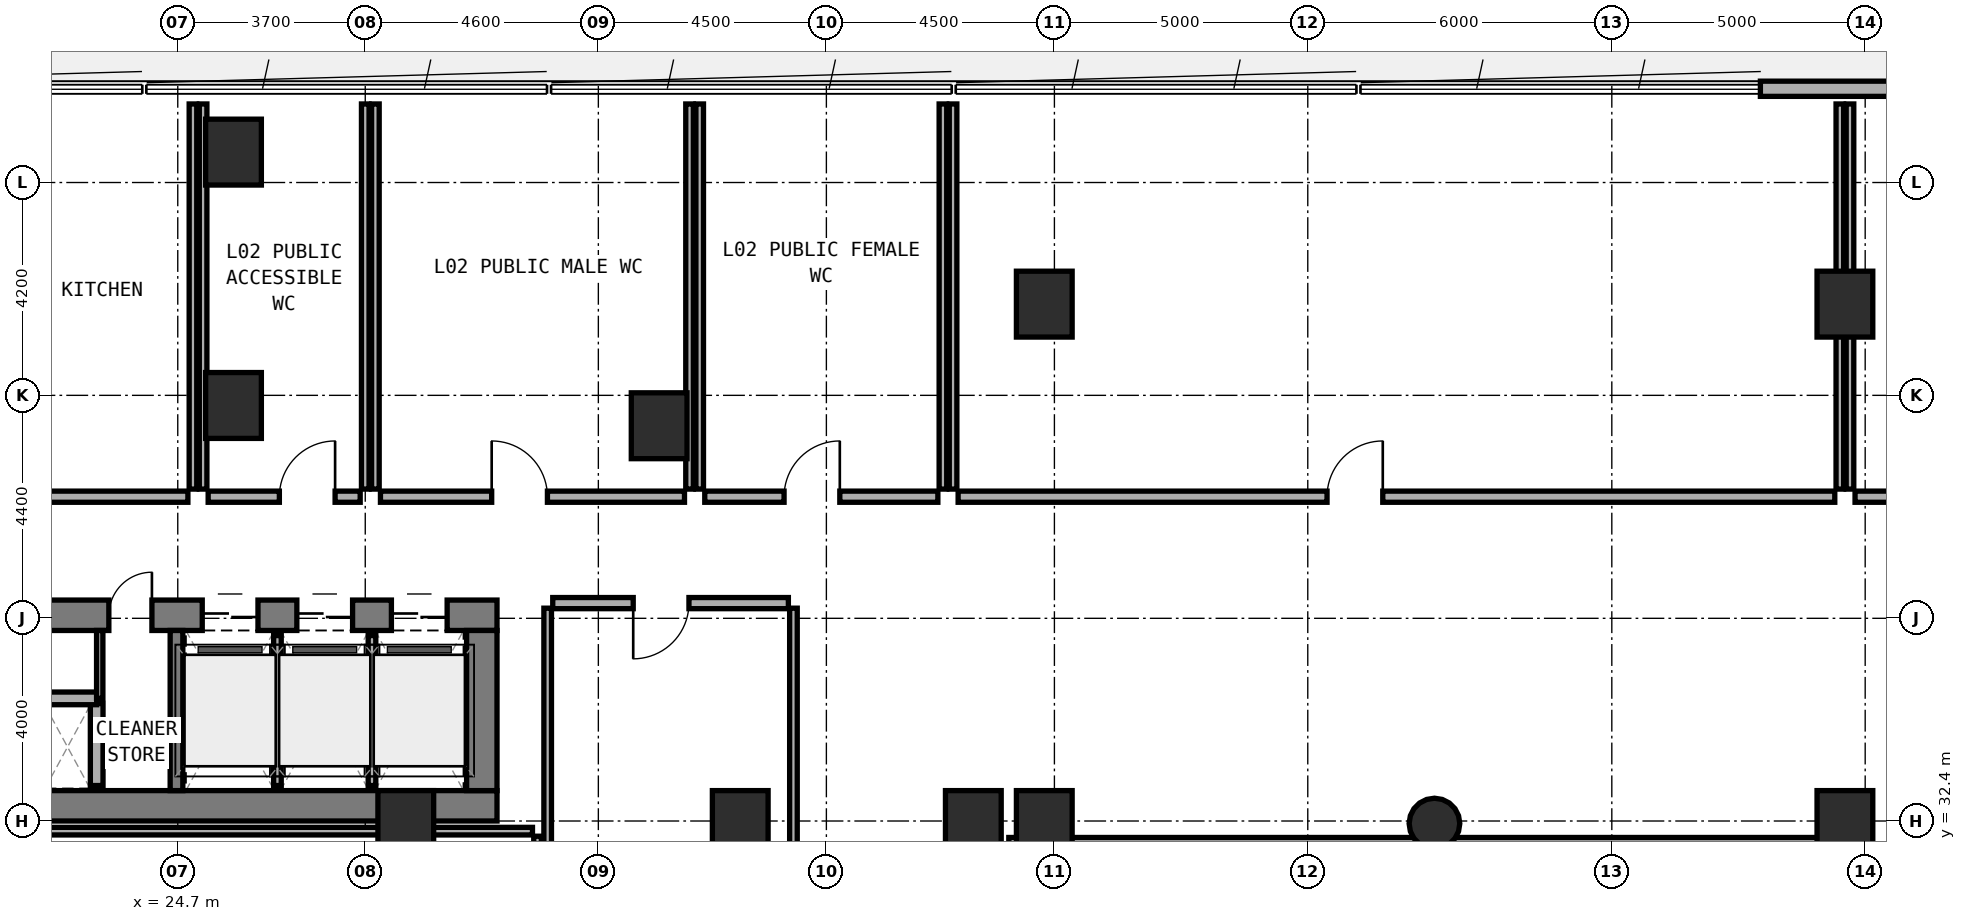
"""IFC4 building model, lengths in metres.
Left out: names, types, materials, properties, quantities, classifications, styles, units other than length and angle.
Written with IfcOpenShell. Run it as: python <this file> out.ifc"""

import sys

from ifc_helpers import new_model, si_unit, direction, frame, frame_2d, origin, origin_2d, place, context, subcontext, project, spatial, rectangle, circle, extrude, element, fill, save


model = new_model("IFC4")
c1 = context("Model", 3, precision=1e-05, world=origin(), true_north=direction((0.0, 1.0)))
c2 = subcontext(c1, "Body", "Model", "MODEL_VIEW")
j1 = project(units=[si_unit("LENGTHUNIT", "METRE"), si_unit("PLANEANGLEUNIT", "RADIAN")], contexts=[c1])
p1 = place(None, origin())
s1 = spatial("IfcSite", under=j1, at=p1, CompositionType="ELEMENT")
p2 = place(p1, origin())
s2 = spatial("IfcBuilding", under=s1, at=p2, CompositionType="ELEMENT")
p3 = place(p2, frame((0.0, 0.0, 10.2)))
s3 = spatial("IfcBuildingStorey", under=s2, at=p3, CompositionType="ELEMENT", Elevation=10.2)
p4 = place(p3, frame((6.2, 32.7, 0.0), z_axis=(0.0, 0.0, 1.0), x_axis=(1.0, 0.0, 0.0)))
e1 = element("IfcWall", 1, at=p4, inside=s3, PredefinedType="SHEAR", context=c2, shape_type="SweptSolid", body=[
    extrude(rectangle(XDim=24.8, YDim=0.6, at=frame_2d((12.4, 0.0))), origin(), (0.0, 0.0, 1.0), 4.8),
])
p5 = place(p3, frame((6.2, 36.46, 0.0), z_axis=(0.0, 0.0, 1.0), x_axis=(1.0, 0.0, 0.0)))
e2 = element("IfcWall", 2, at=p5, inside=s3, PredefinedType="SHEAR", context=c2, shape_type="SweptSolid", body=[
    extrude(rectangle(XDim=24.8, YDim=0.6, at=frame_2d((12.4, 0.0))), origin(), (0.0, 0.0, 1.0), 4.8),
])
p6 = place(p5, frame((9.35, 0.0, 0.0)))
e3 = element("IfcOpeningElement", 3, at=p6, cuts=e2, PredefinedType="OPENING", context=c2, shape_type="SweptSolid", body=[
    extrude(rectangle(XDim=1.2, YDim=2.15, at=frame_2d((0.6, 1.075))), frame((0.0, 0.31, 0.0), z_axis=(0.0, -1.0, 0.0), x_axis=(1.0, 0.0, 0.0)), (0.0, 0.0, 1.0), 0.62),
])
p7 = place(p5, frame((17.14, 0.0, 0.0)))
e4 = element("IfcOpeningElement", 4, at=p7, cuts=e2, PredefinedType="OPENING", context=c2, shape_type="SweptSolid", body=[
    extrude(rectangle(XDim=0.85, YDim=2.1, at=frame_2d((0.425, 1.05))), frame((0.0, 0.31, 0.0), z_axis=(0.0, -1.0, 0.0), x_axis=(1.0, 0.0, 0.0)), (0.0, 0.0, 1.0), 0.62),
])
p8 = place(p5, frame((18.983, 0.0, 0.0)))
e5 = element("IfcOpeningElement", 5, at=p8, cuts=e2, PredefinedType="OPENING", context=c2, shape_type="SweptSolid", body=[
    extrude(rectangle(XDim=1.1, YDim=2.15, at=frame_2d((0.55, 1.075))), frame((0.0, 0.31, 0.0), z_axis=(0.0, -1.0, 0.0), x_axis=(1.0, 0.0, 0.0)), (0.0, 0.0, 1.0), 0.62),
])
p9 = place(p5, frame((20.85, 0.0, 0.0)))
e6 = element("IfcOpeningElement", 6, at=p9, cuts=e2, PredefinedType="OPENING", context=c2, shape_type="SweptSolid", body=[
    extrude(rectangle(XDim=1.1, YDim=2.15, at=frame_2d((0.55, 1.075))), frame((0.0, 0.31, 0.0), z_axis=(0.0, -1.0, 0.0), x_axis=(1.0, 0.0, 0.0)), (0.0, 0.0, 1.0), 0.62),
])
p10 = place(p5, frame((22.716, 0.0, 0.0)))
e7 = element("IfcOpeningElement", 7, at=p10, cuts=e2, PredefinedType="OPENING", context=c2, shape_type="SweptSolid", body=[
    extrude(rectangle(XDim=1.1, YDim=2.15, at=frame_2d((0.55, 1.075))), frame((0.0, 0.31, 0.0), z_axis=(0.0, -1.0, 0.0), x_axis=(1.0, 0.0, 0.0)), (0.0, 0.0, 1.0), 0.62),
])
p11 = place(p3, frame((30.7, 33.0, 0.0), z_axis=(0.0, 0.0, 1.0), x_axis=(0.0, 1.0, 0.0)))
e8 = element("IfcWall", 8, at=p11, inside=s3, PredefinedType="SHEAR", context=c2, shape_type="SweptSolid", body=[
    extrude(rectangle(XDim=3.16, YDim=0.6, at=frame_2d((1.58, 0.0))), origin(), (0.0, 0.0, 1.0), 4.8),
])
p12 = place(p3, frame((24.675, 33.0, 0.0), z_axis=(0.0, 0.0, 1.0), x_axis=(0.0, 1.0, 0.0)))
e9 = element("IfcWall", 9, at=p12, inside=s3, PredefinedType="STANDARD", context=c2, shape_type="SweptSolid", body=[
    extrude(rectangle(XDim=3.16, YDim=0.25, at=frame_2d((1.58, 0.0))), origin(), (0.0, 0.0, 1.0), 4.45),
])
for number, where, z_axis, x_axis in (
    (10, (25.8, 40.6, 0.0), (0.0, 0.0, 1.0), (1.0, 0.0, 0.0)),
    (11, (34.2, 40.2, 0.0), (0.0, 0.0, 1.0), (1.0, 0.0, 0.0)),
    (12, (35.8, 32.35, 0.0), (0.0, 0.0, 1.0), (1.0, 0.0, 0.0)),
    (13, (29.2, 32.35, 0.0), (0.0, 0.0, 1.0), (1.0, 0.0, 0.0)),
    (14, (40.4, 32.35, 0.0), (0.0, 0.0, 1.0), (1.0, 0.0, 0.0)),
    (15, (41.8, 32.35, 0.0), (0.0, 0.0, 1.0), (1.0, 0.0, 0.0)),
):
    element("IfcColumn", number, at=place(p3, frame(where, z_axis=z_axis, x_axis=x_axis)), inside=s3, PredefinedType="COLUMN", context=c2, shape_type="SweptSolid", body=[
        extrude(rectangle(XDim=1.1, YDim=1.3, at=origin_2d()), origin(), (0.0, 0.0, 1.0), 4.8),
    ])
p13 = place(p3, frame((49.5, 32.35, 0.0), z_axis=(0.0, 0.0, 1.0), x_axis=(1.0, 0.0, 0.0)))
e16 = element("IfcColumn", 16, at=p13, inside=s3, PredefinedType="COLUMN", context=c2, shape_type="SweptSolid", body=[
    extrude(circle(Radius=0.5, at=origin_2d()), origin(), (0.0, 0.0, 1.0), 4.8),
])
for number, where, z_axis, x_axis in (
    (17, (57.6, 32.35, 0.0), (0.0, 0.0, 1.0), (1.0, 0.0, 0.0)),
    (18, (25.8, 45.6, 0.0), (0.0, 0.0, 1.0), (1.0, 0.0, 0.0)),
    (19, (41.8, 42.6, 0.0), (0.0, 0.0, 1.0), (1.0, 0.0, 0.0)),
    (20, (57.6, 42.6, 0.0), (0.0, 0.0, 1.0), (1.0, 0.0, 0.0)),
):
    element("IfcColumn", number, at=place(p3, frame(where, z_axis=z_axis, x_axis=x_axis)), inside=s3, PredefinedType="COLUMN", context=c2, shape_type="SweptSolid", body=[
        extrude(rectangle(XDim=1.1, YDim=1.3, at=origin_2d()), origin(), (0.0, 0.0, 1.0), 4.8),
    ])
p14 = place(p3, frame((64.028, 46.85, 0.0), z_axis=(0.0, 0.0, 1.0), x_axis=(-1.0, 0.0, 0.0)))
e21 = element("IfcWall", 21, at=p14, inside=s3, PredefinedType="STANDARD", context=c2, shape_type="SweptSolid", body=[
    extrude(rectangle(XDim=8.096, YDim=0.3, at=frame_2d((4.048, 0.0))), origin(), (0.0, 0.0, 1.0), 4.45),
])
p15 = place(p14, frame((3.228, 0.0, 0.0)))
e22 = element("IfcOpeningElement", 22, at=p15, cuts=e21, PredefinedType="OPENING", context=c2, shape_type="SweptSolid", body=[
    extrude(rectangle(XDim=1.6, YDim=2.2, at=frame_2d((0.8, 1.1))), frame((0.0, 0.16, 0.0), z_axis=(0.0, -1.0, 0.0), x_axis=(1.0, 0.0, 0.0)), (0.0, 0.0, 1.0), 0.32),
])
p16 = place(p3, frame((23.1, 33.1, 0.0), z_axis=(0.0, 0.0, 1.0), x_axis=(0.0, 1.0, 0.0)))
e23 = element("IfcWall", 23, at=p16, inside=s3, PredefinedType="SOLIDWALL", context=c2, shape_type="SweptSolid", body=[
    extrude(rectangle(XDim=1.62, YDim=0.25, at=frame_2d((0.81, 0.0))), origin(), (0.0, 0.0, 1.0), 4.45),
])
p17 = place(p3, frame((21.95, 34.82, 0.0), z_axis=(0.0, 0.0, 1.0), x_axis=(1.0, 0.0, 0.0)))
e24 = element("IfcWall", 24, at=p17, inside=s3, PredefinedType="SOLIDWALL", context=c2, shape_type="SweptSolid", body=[
    extrude(rectangle(XDim=1.15, YDim=0.25, at=frame_2d((0.575, 0.0))), origin(), (0.0, 0.0, 1.0), 4.45),
])
p18 = place(p3, frame((23.16, 34.82, 0.0), z_axis=(0.0, 0.0, 1.0), x_axis=(0.0, 1.0, 0.0)))
e25 = element("IfcWall", 25, at=p18, inside=s3, PredefinedType="PARTITIONING", context=c2, shape_type="SweptSolid", body=[
    extrude(rectangle(XDim=1.34, YDim=0.125, at=frame_2d((0.67, 0.0))), origin(), (0.0, 0.0, 1.0), 4.45),
])
p19 = place(p3, frame((26.667, 33.1, 0.0), z_axis=(0.0, 0.0, 1.0), x_axis=(0.0, 1.0, 0.0)))
e26 = element("IfcWall", 26, at=p19, inside=s3, PredefinedType="PARTITIONING", context=c2, shape_type="SweptSolid", body=[
    extrude(rectangle(XDim=2.96, YDim=0.15, at=frame_2d((1.48, 0.0))), origin(), (0.0, 0.0, 1.0), 4.45),
])
p20 = place(p3, frame((28.533, 33.1, 0.0), z_axis=(0.0, 0.0, 1.0), x_axis=(0.0, 1.0, 0.0)))
e27 = element("IfcWall", 27, at=p20, inside=s3, PredefinedType="PARTITIONING", context=c2, shape_type="SweptSolid", body=[
    extrude(rectangle(XDim=2.96, YDim=0.15, at=frame_2d((1.48, 0.0))), origin(), (0.0, 0.0, 1.0), 3.525),
])
p21 = place(p3, frame((31.8, 17.9, 0.0), z_axis=(0.0, 0.0, 1.0), x_axis=(0.0, 1.0, 0.0)))
e28 = element("IfcWall", 28, at=p21, inside=s3, PredefinedType="PARTITIONING", context=c2, shape_type="SweptSolid", body=[
    extrude(rectangle(XDim=14.2, YDim=0.15, at=frame_2d((7.1, 0.0))), origin(), (0.0, 0.0, 1.0), 3.425),
])
p22 = place(p3, frame((11.9, 32.2, 0.0), z_axis=(0.0, 0.0, 1.0), x_axis=(1.0, 0.0, 0.0)))
e29 = element("IfcWall", 29, at=p22, inside=s3, PredefinedType="PARTITIONING", context=c2, shape_type="SweptSolid", body=[
    extrude(rectangle(XDim=19.8, YDim=0.15, at=frame_2d((9.9, 0.0))), origin(), (0.0, 0.0, 1.0), 3.525),
])
p23 = place(p3, frame((25.0, 38.95, 0.0), z_axis=(0.0, 0.0, 1.0), x_axis=(0.0, 1.0, 0.0)))
e30 = element("IfcWall", 30, at=p23, inside=s3, PredefinedType="PARTITIONING", context=c2, shape_type="SweptSolid", body=[
    extrude(rectangle(XDim=7.6, YDim=0.15, at=frame_2d((3.8, 0.0))), origin(), (0.0, 0.0, 1.0), 3.975),
])
p24 = place(p3, frame((10.7, 38.8, 0.0), z_axis=(0.0, 0.0, 1.0), x_axis=(1.0, 0.0, 0.0)))
e31 = element("IfcWall", 31, at=p24, inside=s3, PredefinedType="SOLIDWALL", context=c2, shape_type="SweptSolid", body=[
    extrude(rectangle(XDim=14.2, YDim=0.22, at=frame_2d((7.1, 0.0))), origin(), (0.0, 0.0, 1.0), 4.45),
])
p25 = place(p24, frame((6.445, 0.0, 0.0)))
e32 = element("IfcOpeningElement", 32, at=p25, cuts=e31, PredefinedType="OPENING", context=c2, shape_type="SweptSolid", body=[
    extrude(rectangle(XDim=1.1, YDim=2.1, at=frame_2d((0.55, 1.05))), frame((0.0, 0.12, 0.0), z_axis=(0.0, -1.0, 0.0), x_axis=(1.0, 0.0, 0.0)), (0.0, 0.0, 1.0), 0.24),
])
p26 = place(p3, frame((40.0, 38.95, 0.0), z_axis=(0.0, 0.0, 1.0), x_axis=(0.0, 1.0, 0.0)))
e33 = element("IfcWall", 33, at=p26, inside=s3, PredefinedType="PARTITIONING", context=c2, shape_type="SweptSolid", body=[
    extrude(rectangle(XDim=7.6, YDim=0.15, at=frame_2d((3.8, 0.0))), origin(), (0.0, 0.0, 1.0), 4.45),
])
p27 = place(p3, frame((57.5, 38.95, 0.0), z_axis=(0.0, 0.0, 1.0), x_axis=(0.0, 1.0, 0.0)))
e34 = element("IfcWall", 34, at=p27, inside=s3, PredefinedType="PARTITIONING", context=c2, shape_type="SweptSolid", body=[
    extrude(rectangle(XDim=7.6, YDim=0.15, at=frame_2d((3.8, 0.0))), origin(), (0.0, 0.0, 1.0), 3.625),
])
p28 = place(p3, frame((40.1, 38.8, 0.0), z_axis=(0.0, 0.0, 1.0), x_axis=(1.0, 0.0, 0.0)))
e35 = element("IfcWall", 35, at=p28, inside=s3, PredefinedType="SOLIDWALL", context=c2, shape_type="SweptSolid", body=[
    extrude(rectangle(XDim=17.3, YDim=0.22, at=frame_2d((8.65, 0.0))), origin(), (0.0, 0.0, 1.0), 3.725),
])
p29 = place(p28, frame((7.28, 0.0, 0.0)))
e36 = element("IfcOpeningElement", 36, at=p29, cuts=e35, PredefinedType="OPENING", context=c2, shape_type="SweptSolid", body=[
    extrude(rectangle(XDim=1.1, YDim=2.1, at=frame_2d((0.55, 1.05))), frame((0.0, 0.12, 0.0), z_axis=(0.0, -1.0, 0.0), x_axis=(1.0, 0.0, 0.0)), (0.0, 0.0, 1.0), 0.24),
])
p30 = place(p3, frame((57.7, 38.95, 0.0), z_axis=(0.0, 0.0, 1.0), x_axis=(0.0, 1.0, 0.0)))
e37 = element("IfcWall", 37, at=p30, inside=s3, PredefinedType="PARTITIONING", context=c2, shape_type="SweptSolid", body=[
    extrude(rectangle(XDim=7.6, YDim=0.15, at=frame_2d((3.8, 0.0))), origin(), (0.0, 0.0, 1.0), 3.725),
])
p31 = place(p3, frame((57.8, 38.8, 0.0), z_axis=(0.0, 0.0, 1.0), x_axis=(1.0, 0.0, 0.0)))
e38 = element("IfcWall", 38, at=p31, inside=s3, PredefinedType="SOLIDWALL", context=c2, shape_type="SweptSolid", body=[
    extrude(rectangle(XDim=37.75, YDim=0.22, at=frame_2d((18.875, 0.0))), origin(), (0.0, 0.0, 1.0), 3.925),
])
p32 = place(p31, frame((16.482, 0.0, 0.0)))
e39 = element("IfcOpeningElement", 39, at=p32, cuts=e38, PredefinedType="OPENING", context=c2, shape_type="SweptSolid", body=[
    extrude(rectangle(XDim=1.1, YDim=2.1, at=frame_2d((0.55, 1.05))), frame((0.0, 0.12, 0.0), z_axis=(0.0, -1.0, 0.0), x_axis=(1.0, 0.0, 0.0)), (0.0, 0.0, 1.0), 0.24),
])
p33 = place(p3, frame((41.1, 32.0, 0.0), z_axis=(0.0, 0.0, 1.0), x_axis=(1.0, 0.0, 0.0)))
e40 = element("IfcWall", 40, at=p33, inside=s3, PredefinedType="PARTITIONING", context=c2, shape_type="SweptSolid", body=[
    extrude(rectangle(XDim=16.6, YDim=0.15, at=frame_2d((8.3, 0.0))), origin(), (0.0, 0.0, 1.0), 3.725),
])
for number, where, z_axis, x_axis in (
    (41, (25.2, 38.95, 0.0), (0.0, 0.0, 1.0), (0.0, 1.0, 0.0)),
    (42, (28.4, 38.95, 0.0), (0.0, 0.0, 1.0), (0.0, 1.0, 0.0)),
):
    element("IfcWall", number, at=place(p3, frame(where, z_axis=z_axis, x_axis=x_axis)), inside=s3, PredefinedType="PARTITIONING", context=c2, shape_type="SweptSolid", body=[
        extrude(rectangle(XDim=7.6, YDim=0.15, at=frame_2d((3.8, 0.0))), origin(), (0.0, 0.0, 1.0), 3.975),
    ])
p34 = place(p3, frame((25.3, 38.8, 0.0), z_axis=(0.0, 0.0, 1.0), x_axis=(1.0, 0.0, 0.0)))
e43 = element("IfcWall", 43, at=p34, inside=s3, PredefinedType="SOLIDWALL", context=c2, shape_type="SweptSolid", body=[
    extrude(rectangle(XDim=3.0, YDim=0.22, at=frame_2d((1.5, 0.0))), origin(), (0.0, 0.0, 1.0), 3.525),
])
p35 = place(p34, frame((1.405, 0.0, 0.0)))
e44 = element("IfcOpeningElement", 44, at=p35, cuts=e43, PredefinedType="OPENING", context=c2, shape_type="SweptSolid", body=[
    extrude(rectangle(XDim=1.1, YDim=2.1, at=frame_2d((0.55, 1.05))), frame((0.0, 0.12, 0.0), z_axis=(0.0, -1.0, 0.0), x_axis=(1.0, 0.0, 0.0)), (0.0, 0.0, 1.0), 0.24),
])
p36 = place(p3, frame((28.6, 38.95, 0.0), z_axis=(0.0, 0.0, 1.0), x_axis=(0.0, 1.0, 0.0)))
e45 = element("IfcWall", 45, at=p36, inside=s3, PredefinedType="PARTITIONING", context=c2, shape_type="SweptSolid", body=[
    extrude(rectangle(XDim=7.6, YDim=0.15, at=frame_2d((3.8, 0.0))), origin(), (0.0, 0.0, 1.0), 3.975),
])
p37 = place(p3, frame((34.8, 38.95, 0.0), z_axis=(0.0, 0.0, 1.0), x_axis=(0.0, 1.0, 0.0)))
e46 = element("IfcWall", 46, at=p37, inside=s3, PredefinedType="PARTITIONING", context=c2, shape_type="SweptSolid", body=[
    extrude(rectangle(XDim=7.6, YDim=0.15, at=frame_2d((3.8, 0.0))), origin(), (0.0, 0.0, 1.0), 4.45),
])
p38 = place(p3, frame((28.7, 38.8, 0.0), z_axis=(0.0, 0.0, 1.0), x_axis=(1.0, 0.0, 0.0)))
e47 = element("IfcWall", 47, at=p38, inside=s3, PredefinedType="SOLIDWALL", context=c2, shape_type="SweptSolid", body=[
    extrude(rectangle(XDim=6.0, YDim=0.22, at=frame_2d((3.0, 0.0))), origin(), (0.0, 0.0, 1.0), 3.975),
])
p39 = place(p38, frame((2.195, 0.0, 0.0)))
e48 = element("IfcOpeningElement", 48, at=p39, cuts=e47, PredefinedType="OPENING", context=c2, shape_type="SweptSolid", body=[
    extrude(rectangle(XDim=1.1, YDim=2.1, at=frame_2d((0.55, 1.05))), frame((0.0, 0.12, 0.0), z_axis=(0.0, -1.0, 0.0), x_axis=(1.0, 0.0, 0.0)), (0.0, 0.0, 1.0), 0.24),
])
for number, where, z_axis, x_axis in (
    (49, (35.0, 38.95, 0.0), (0.0, 0.0, 1.0), (0.0, 1.0, 0.0)),
    (50, (39.8, 38.95, 0.0), (0.0, 0.0, 1.0), (0.0, 1.0, 0.0)),
):
    element("IfcWall", number, at=place(p3, frame(where, z_axis=z_axis, x_axis=x_axis)), inside=s3, PredefinedType="PARTITIONING", context=c2, shape_type="SweptSolid", body=[
        extrude(rectangle(XDim=7.6, YDim=0.15, at=frame_2d((3.8, 0.0))), origin(), (0.0, 0.0, 1.0), 4.45),
    ])
p40 = place(p3, frame((35.1, 38.8, 0.0), z_axis=(0.0, 0.0, 1.0), x_axis=(1.0, 0.0, 0.0)))
e51 = element("IfcWall", 51, at=p40, inside=s3, PredefinedType="SOLIDWALL", context=c2, shape_type="SweptSolid", body=[
    extrude(rectangle(XDim=4.6, YDim=0.22, at=frame_2d((2.3, 0.0))), origin(), (0.0, 0.0, 1.0), 4.45),
])
p41 = place(p40, frame((1.565, 0.0, 0.0)))
e52 = element("IfcOpeningElement", 52, at=p41, cuts=e51, PredefinedType="OPENING", context=c2, shape_type="SweptSolid", body=[
    extrude(rectangle(XDim=1.1, YDim=2.1, at=frame_2d((0.55, 1.05))), frame((0.0, 0.12, 0.0), z_axis=(0.0, -1.0, 0.0), x_axis=(1.0, 0.0, 0.0)), (0.0, 0.0, 1.0), 0.24),
])
for number, where, z_axis, x_axis in (
    (53, (32.0, 25.3, 0.0), (0.0, 0.0, 1.0), (0.0, 1.0, 0.0)),
    (54, (36.85, 25.3, 0.0), (0.0, 0.0, 1.0), (0.0, 1.0, 0.0)),
):
    element("IfcWall", number, at=place(p3, frame(where, z_axis=z_axis, x_axis=x_axis)), inside=s3, PredefinedType="PARTITIONING", context=c2, shape_type="SweptSolid", body=[
        extrude(rectangle(XDim=11.3, YDim=0.15, at=frame_2d((5.65, 0.0))), origin(), (0.0, 0.0, 1.0), 3.525),
    ])
p42 = place(p3, frame((32.1, 36.7, 0.0), z_axis=(0.0, 0.0, 1.0), x_axis=(1.0, 0.0, 0.0)))
e55 = element("IfcWall", 55, at=p42, inside=s3, PredefinedType="SOLIDWALL", context=c2, shape_type="SweptSolid", body=[
    extrude(rectangle(XDim=4.65, YDim=0.22, at=frame_2d((2.325, 0.0))), origin(), (0.0, 0.0, 1.0), 3.975),
])
p43 = place(p42, frame((1.588, 0.0, 0.0)))
e56 = element("IfcOpeningElement", 56, at=p43, cuts=e55, PredefinedType="OPENING", context=c2, shape_type="SweptSolid", body=[
    extrude(rectangle(XDim=1.1, YDim=2.1, at=frame_2d((0.55, 1.05))), frame((0.0, 0.12, 0.0), z_axis=(0.0, -1.0, 0.0), x_axis=(1.0, 0.0, 0.0)), (0.0, 0.0, 1.0), 0.24),
])
p44 = place(p7, origin())
e57 = element("IfcDoor", 57, at=p44, inside=s3, OperationType="SINGLE_SWING_RIGHT", PredefinedType="DOOR", context=c2, shape_type="SweptSolid", body=[
    extrude(rectangle(XDim=0.85, YDim=2.1, at=frame_2d((0.425, 1.05))), frame((0.0, 0.025, 0.0), z_axis=(0.0, -1.0, 0.0), x_axis=(1.0, 0.0, 0.0)), (0.0, 0.0, 1.0), 0.05),
])
fill(e4, e57)
p45 = place(p8, origin())
e58 = element("IfcDoor", 58, at=p45, inside=s3, OperationType="DOUBLE_DOOR_SLIDING", PredefinedType="DOOR", context=c2, shape_type="SweptSolid", body=[
    extrude(rectangle(XDim=1.1, YDim=2.15, at=frame_2d((0.55, 1.075))), frame((0.0, 0.025, 0.0), z_axis=(0.0, -1.0, 0.0), x_axis=(1.0, 0.0, 0.0)), (0.0, 0.0, 1.0), 0.05),
])
fill(e5, e58)
p46 = place(p9, origin())
e59 = element("IfcDoor", 59, at=p46, inside=s3, OperationType="DOUBLE_DOOR_SLIDING", PredefinedType="DOOR", context=c2, shape_type="SweptSolid", body=[
    extrude(rectangle(XDim=1.1, YDim=2.15, at=frame_2d((0.55, 1.075))), frame((0.0, 0.025, 0.0), z_axis=(0.0, -1.0, 0.0), x_axis=(1.0, 0.0, 0.0)), (0.0, 0.0, 1.0), 0.05),
])
fill(e6, e59)
p47 = place(p10, origin())
e60 = element("IfcDoor", 60, at=p47, inside=s3, OperationType="DOUBLE_DOOR_SLIDING", PredefinedType="DOOR", context=c2, shape_type="SweptSolid", body=[
    extrude(rectangle(XDim=1.1, YDim=2.15, at=frame_2d((0.55, 1.075))), frame((0.0, 0.025, 0.0), z_axis=(0.0, -1.0, 0.0), x_axis=(1.0, 0.0, 0.0)), (0.0, 0.0, 1.0), 0.05),
])
fill(e7, e60)
p48 = place(p29, origin())
e61 = element("IfcDoor", 61, at=p48, inside=s3, OperationType="SINGLE_SWING_RIGHT", PredefinedType="DOOR", context=c2, shape_type="SweptSolid", body=[
    extrude(rectangle(XDim=1.1, YDim=2.1, at=frame_2d((0.55, 1.05))), frame((0.0, 0.025, 0.0), z_axis=(0.0, -1.0, 0.0), x_axis=(1.0, 0.0, 0.0)), (0.0, 0.0, 1.0), 0.05),
])
fill(e36, e61)
p49 = place(p35, origin())
e62 = element("IfcDoor", 62, at=p49, inside=s3, OperationType="SINGLE_SWING_RIGHT", PredefinedType="DOOR", context=c2, shape_type="SweptSolid", body=[
    extrude(rectangle(XDim=1.1, YDim=2.1, at=frame_2d((0.55, 1.05))), frame((0.0, 0.025, 0.0), z_axis=(0.0, -1.0, 0.0), x_axis=(1.0, 0.0, 0.0)), (0.0, 0.0, 1.0), 0.05),
])
fill(e44, e62)
p50 = place(p39, origin())
e63 = element("IfcDoor", 63, at=p50, inside=s3, OperationType="SINGLE_SWING_LEFT", PredefinedType="DOOR", context=c2, shape_type="SweptSolid", body=[
    extrude(rectangle(XDim=1.1, YDim=2.1, at=frame_2d((0.55, 1.05))), frame((0.0, 0.025, 0.0), z_axis=(0.0, -1.0, 0.0), x_axis=(1.0, 0.0, 0.0)), (0.0, 0.0, 1.0), 0.05),
])
fill(e48, e63)
p51 = place(p41, origin())
e64 = element("IfcDoor", 64, at=p51, inside=s3, OperationType="SINGLE_SWING_RIGHT", PredefinedType="DOOR", context=c2, shape_type="SweptSolid", body=[
    extrude(rectangle(XDim=1.1, YDim=2.1, at=frame_2d((0.55, 1.05))), frame((0.0, 0.025, 0.0), z_axis=(0.0, -1.0, 0.0), x_axis=(1.0, 0.0, 0.0)), (0.0, 0.0, 1.0), 0.05),
])
fill(e52, e64)
p52 = place(p43, frame((1.1, 0.0, 0.0), z_axis=(0.0, 0.0, 1.0), x_axis=(-1.0, 0.0, 0.0)))
e65 = element("IfcDoor", 65, at=p52, inside=s3, OperationType="SINGLE_SWING_RIGHT", PredefinedType="DOOR", context=c2, shape_type="SweptSolid", body=[
    extrude(rectangle(XDim=1.1, YDim=2.1, at=frame_2d((0.55, 1.05))), frame((0.0, 0.025, 0.0), z_axis=(0.0, -1.0, 0.0), x_axis=(1.0, 0.0, 0.0)), (0.0, 0.0, 1.0), 0.05),
])
fill(e56, e65)
save(model, sys.argv[1])
